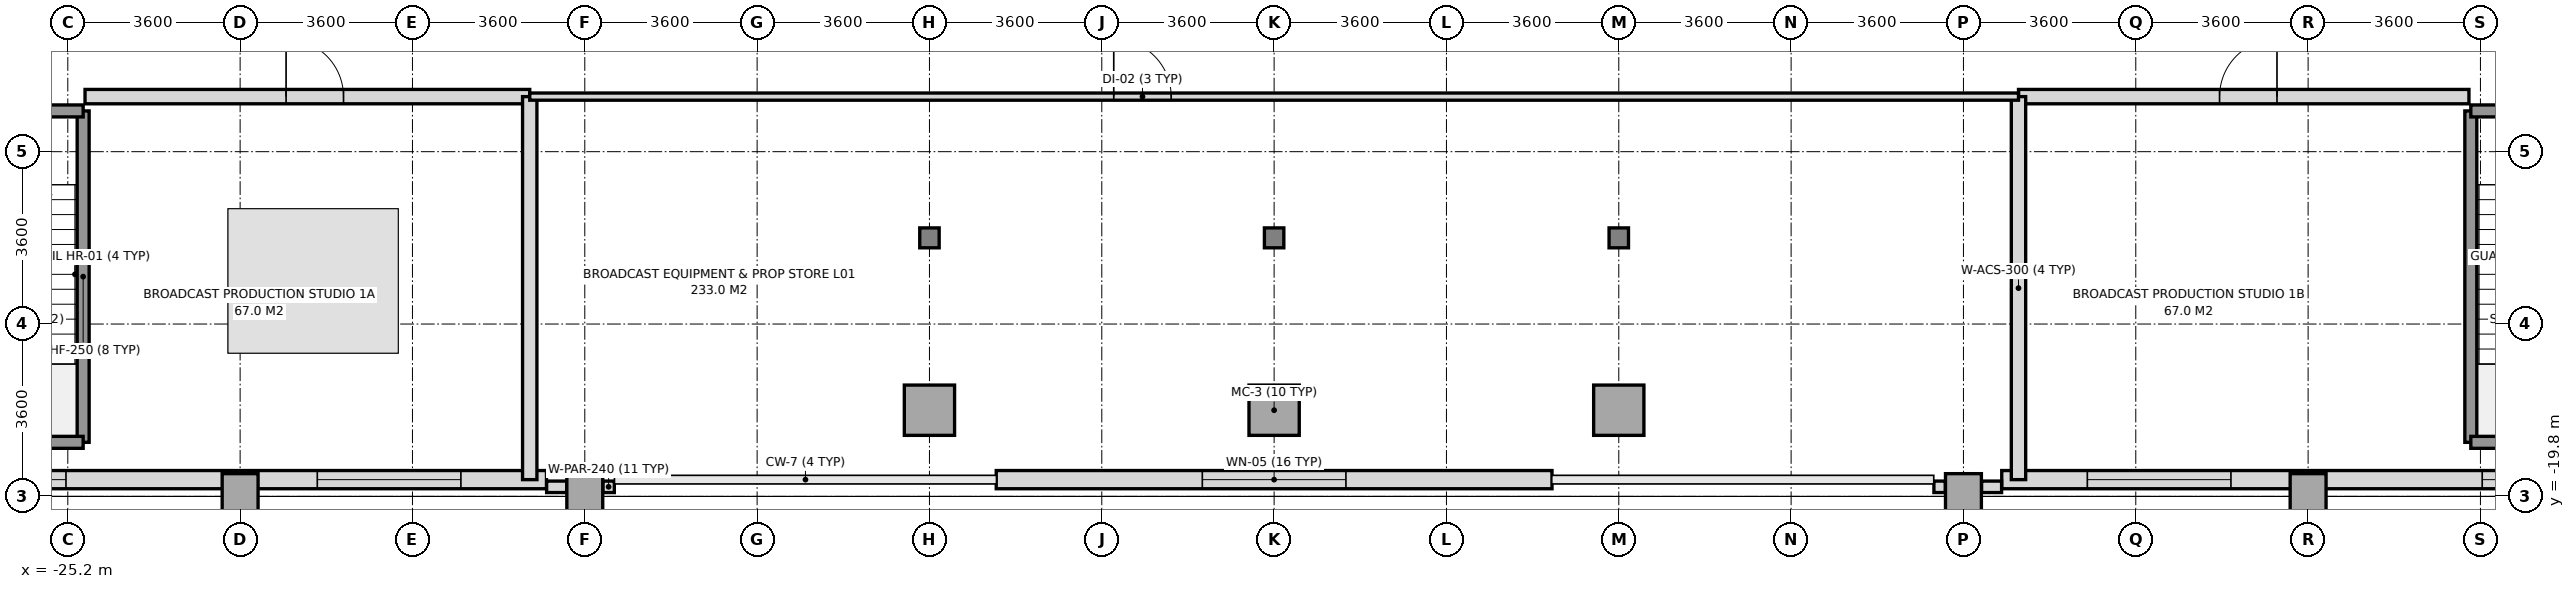
"""IFC4 building model, lengths in metres.
Left out: names, types, materials, properties, quantities, classifications, styles, units other than length and angle.
Written with IfcOpenShell. Run it as: python <this file> out.ifc"""

import sys

from ifc_helpers import new_model, si_unit, direction, frame, frame_2d, origin, origin_2d, place, context, subcontext, project, spatial, rectangle, i_section, extrude, source, transform, mapped, element, fill, save


model = new_model("IFC4")
c1 = context("Model", 3, precision=1e-05, world=origin(), true_north=direction((0.0, 1.0)))
c2 = subcontext(c1, "Body", "Model", "MODEL_VIEW")
j1 = project(units=[si_unit("LENGTHUNIT", "METRE"), si_unit("PLANEANGLEUNIT", "RADIAN")], contexts=[c1])
p1 = place(None, origin())
s1 = spatial("IfcSite", under=j1, at=p1, CompositionType="ELEMENT")
p2 = place(p1, origin())
s2 = spatial("IfcBuilding", under=s1, at=p2, CompositionType="ELEMENT")
p3 = place(p2, frame((0.0, 0.0, 5.4)))
s3 = spatial("IfcBuildingStorey", under=s2, at=p3, CompositionType="ELEMENT", Elevation=5.4)
m1 = source(origin(), c2, "Body", "SweptSolid", [
    extrude(rectangle(XDim=0.75, YDim=0.95, at=origin_2d()), origin(), (0.0, 0.0, 1.0), 4.52),
])
for number, where, z_axis, x_axis in (
    (1, (-21.6, -19.8, 0.0), (0.0, 0.0, 1.0), (1.0, 0.0, 0.0)),
    (2, (-14.4, -19.8, 0.0), (0.0, 0.0, 1.0), (1.0, 0.0, 0.0)),
):
    element("IfcColumn", number, at=place(p3, frame(where, z_axis=z_axis, x_axis=x_axis)), inside=s3, PredefinedType="COLUMN", context=c2, shape_type="MappedRepresentation", body=[
        mapped(m1, transform((0.0, 0.0, 0.0), x_axis=(1.0, 0.0, 0.0), y_axis=(0.0, 1.0, 0.0), z_axis=(0.0, 0.0, 1.0), scale=1.0)),
    ])
m2 = source(origin(), c2, "Body", "SweptSolid", [
    extrude(rectangle(XDim=1.05, YDim=1.05, at=origin_2d()), origin(), (0.0, 0.0, 1.0), 4.52),
])
p4 = place(p3, frame((-7.2, -18.0, 0.0), z_axis=(0.0, 0.0, 1.0), x_axis=(1.0, 0.0, 0.0)))
e3 = element("IfcColumn", 3, at=p4, inside=s3, PredefinedType="COLUMN", context=c2, shape_type="MappedRepresentation", body=[
    mapped(m2, transform((0.0, 0.0, 0.0), x_axis=(1.0, 0.0, 0.0), y_axis=(0.0, 1.0, 0.0), z_axis=(0.0, 0.0, 1.0), scale=1.0)),
])
m3 = source(origin(), c2, "Body", "SweptSolid", [
    extrude(i_section(OverallWidth=0.406, OverallDepth=0.416, WebThickness=0.024, FlangeThickness=0.039, at=origin_2d()), origin(), (0.0, 0.0, 1.0), 4.52),
])
p5 = place(p3, frame((-7.2, -14.4, 0.0), z_axis=(0.0, 0.0, 1.0), x_axis=(1.0, 0.0, 0.0)))
e4 = element("IfcColumn", 4, at=p5, inside=s3, PredefinedType="COLUMN", context=c2, shape_type="MappedRepresentation", body=[
    mapped(m3, transform((0.0, 0.0, 0.0), x_axis=(1.0, 0.0, 0.0), y_axis=(0.0, 1.0, 0.0), z_axis=(0.0, 0.0, 1.0), scale=1.0)),
])
p6 = place(p3, frame((0.0, -18.0, 0.0), z_axis=(0.0, 0.0, 1.0), x_axis=(1.0, 0.0, 0.0)))
e5 = element("IfcColumn", 5, at=p6, inside=s3, PredefinedType="COLUMN", context=c2, shape_type="MappedRepresentation", body=[
    mapped(m2, transform((0.0, 0.0, 0.0), x_axis=(1.0, 0.0, 0.0), y_axis=(0.0, 1.0, 0.0), z_axis=(0.0, 0.0, 1.0), scale=1.0)),
])
p7 = place(p3, frame((0.0, -14.4, 0.0), z_axis=(0.0, 0.0, 1.0), x_axis=(1.0, 0.0, 0.0)))
e6 = element("IfcColumn", 6, at=p7, inside=s3, PredefinedType="COLUMN", context=c2, shape_type="MappedRepresentation", body=[
    mapped(m3, transform((0.0, 0.0, 0.0), x_axis=(1.0, 0.0, 0.0), y_axis=(0.0, 1.0, 0.0), z_axis=(0.0, 0.0, 1.0), scale=1.0)),
])
p8 = place(p3, frame((7.2, -18.0, 0.0), z_axis=(0.0, 0.0, 1.0), x_axis=(1.0, 0.0, 0.0)))
e7 = element("IfcColumn", 7, at=p8, inside=s3, PredefinedType="COLUMN", context=c2, shape_type="MappedRepresentation", body=[
    mapped(m2, transform((0.0, 0.0, 0.0), x_axis=(1.0, 0.0, 0.0), y_axis=(0.0, 1.0, 0.0), z_axis=(0.0, 0.0, 1.0), scale=1.0)),
])
p9 = place(p3, frame((7.2, -14.4, 0.0), z_axis=(0.0, 0.0, 1.0), x_axis=(1.0, 0.0, 0.0)))
e8 = element("IfcColumn", 8, at=p9, inside=s3, PredefinedType="COLUMN", context=c2, shape_type="MappedRepresentation", body=[
    mapped(m3, transform((0.0, 0.0, 0.0), x_axis=(1.0, 0.0, 0.0), y_axis=(0.0, 1.0, 0.0), z_axis=(0.0, 0.0, 1.0), scale=1.0)),
])
for number, where, z_axis, x_axis in (
    (9, (14.4, -19.8, 0.0), (0.0, 0.0, 1.0), (1.0, 0.0, 0.0)),
    (10, (21.6, -19.8, 0.0), (0.0, 0.0, 1.0), (1.0, 0.0, 0.0)),
):
    element("IfcColumn", number, at=place(p3, frame(where, z_axis=z_axis, x_axis=x_axis)), inside=s3, PredefinedType="COLUMN", context=c2, shape_type="MappedRepresentation", body=[
        mapped(m1, transform((0.0, 0.0, 0.0), x_axis=(1.0, 0.0, 0.0), y_axis=(0.0, 1.0, 0.0), z_axis=(0.0, 0.0, 1.0), scale=1.0)),
    ])
p10 = place(p3, frame((-32.05, -19.45, 0.0), z_axis=(0.0, 0.0, 1.0), x_axis=(1.0, 0.0, 0.0)))
e11 = element("IfcWall", 11, at=p10, inside=s3, PredefinedType="SOLIDWALL", context=c2, shape_type="SweptSolid", body=[
    extrude(rectangle(XDim=16.85, YDim=0.38, at=frame_2d((8.425, 0.0))), origin(), (0.0, 0.0, 1.0), 3.77),
])
p11 = place(p10, frame((3.812, 0.0, 0.95)))
e12 = element("IfcOpeningElement", 12, at=p11, cuts=e11, PredefinedType="OPENING", context=c2, shape_type="SweptSolid", body=[
    extrude(rectangle(XDim=3.0, YDim=2.4, at=frame_2d((1.5, 1.2))), frame((0.0, 0.2, 0.0), z_axis=(0.0, -1.0, 0.0), x_axis=(1.0, 0.0, 0.0)), (0.0, 0.0, 1.0), 0.4),
])
p12 = place(p10, frame((12.062, 0.0, 0.95)))
e13 = element("IfcOpeningElement", 13, at=p12, cuts=e11, PredefinedType="OPENING", context=c2, shape_type="SweptSolid", body=[
    extrude(rectangle(XDim=3.0, YDim=2.4, at=frame_2d((1.5, 1.2))), frame((0.0, 0.2, 0.0), z_axis=(0.0, -1.0, 0.0), x_axis=(1.0, 0.0, 0.0)), (0.0, 0.0, 1.0), 0.4),
])
p13 = place(p3, frame((15.2, -19.45, 0.0), z_axis=(0.0, 0.0, 1.0), x_axis=(1.0, 0.0, 0.0)))
e14 = element("IfcWall", 14, at=p13, inside=s3, PredefinedType="SOLIDWALL", context=c2, shape_type="SweptSolid", body=[
    extrude(rectangle(XDim=16.85, YDim=0.38, at=frame_2d((8.425, 0.0))), origin(), (0.0, 0.0, 1.0), 3.77),
])
p14 = place(p13, frame((1.788, 0.0, 0.95)))
e15 = element("IfcOpeningElement", 15, at=p14, cuts=e14, PredefinedType="OPENING", context=c2, shape_type="SweptSolid", body=[
    extrude(rectangle(XDim=3.0, YDim=2.4, at=frame_2d((1.5, 1.2))), frame((0.0, 0.2, 0.0), z_axis=(0.0, -1.0, 0.0), x_axis=(1.0, 0.0, 0.0)), (0.0, 0.0, 1.0), 0.4),
])
p15 = place(p13, frame((10.037, 0.0, 0.95)))
e16 = element("IfcOpeningElement", 16, at=p15, cuts=e14, PredefinedType="OPENING", context=c2, shape_type="SweptSolid", body=[
    extrude(rectangle(XDim=3.0, YDim=2.4, at=frame_2d((1.5, 1.2))), frame((0.0, 0.2, 0.0), z_axis=(0.0, -1.0, 0.0), x_axis=(1.0, 0.0, 0.0)), (0.0, 0.0, 1.0), 0.4),
])
p16 = place(p3, frame((-5.805, -19.45, 0.0), z_axis=(0.0, 0.0, 1.0), x_axis=(1.0, 0.0, 0.0)))
e17 = element("IfcWall", 17, at=p16, inside=s3, PredefinedType="SOLIDWALL", context=c2, shape_type="SweptSolid", body=[
    extrude(rectangle(XDim=11.61, YDim=0.38, at=frame_2d((5.805, 0.0))), origin(), (0.0, 0.0, 1.0), 3.92),
])
p17 = place(p16, frame((4.305, 0.0, 0.95)))
e18 = element("IfcOpeningElement", 18, at=p17, cuts=e17, PredefinedType="OPENING", context=c2, shape_type="SweptSolid", body=[
    extrude(rectangle(XDim=3.0, YDim=2.4, at=frame_2d((1.5, 1.2))), frame((0.0, 0.2, 0.0), z_axis=(0.0, -1.0, 0.0), x_axis=(1.0, 0.0, 0.0)), (0.0, 0.0, 1.0), 0.4),
])
p18 = place(p3, frame((15.197, -19.6, 0.0), z_axis=(0.0, 0.0, 1.0), x_axis=(-1.0, 0.0, 0.0)))
e19 = element("IfcWall", 19, at=p18, inside=s3, PredefinedType="PARAPET", context=c2, shape_type="SweptSolid", body=[
    extrude(rectangle(XDim=0.419, YDim=0.24, at=frame_2d((0.209, 0.0))), origin(), (0.0, 0.0, 1.0), 1.15),
])
for number, where, z_axis, x_axis in (
    (20, (14.022, -19.6, 0.0), (0.0, 0.0, 1.0), (-1.0, 0.0, 0.0)),
    (21, (-13.783, -19.6, 0.0), (0.0, 0.0, 1.0), (-1.0, 0.0, 0.0)),
):
    element("IfcWall", number, at=place(p3, frame(where, z_axis=z_axis, x_axis=x_axis)), inside=s3, PredefinedType="PARAPET", context=c2, shape_type="SweptSolid", body=[
        extrude(rectangle(XDim=0.239, YDim=0.24, at=frame_2d((0.12, 0.0))), origin(), (0.0, 0.0, 1.0), 1.15),
    ])
p19 = place(p3, frame((-14.778, -19.6, 0.0), z_axis=(0.0, 0.0, 1.0), x_axis=(-1.0, 0.0, 0.0)))
e22 = element("IfcWall", 22, at=p19, inside=s3, PredefinedType="PARAPET", context=c2, shape_type="SweptSolid", body=[
    extrude(rectangle(XDim=0.419, YDim=0.24, at=frame_2d((0.209, 0.0))), origin(), (0.0, 0.0, 1.0), 1.15),
])
p20 = place(p3, frame((-24.879, -18.671, 0.0), z_axis=(0.0, 0.0, 1.0), x_axis=(0.0, 1.0, 0.0)))
e23 = element("IfcWall", 23, at=p20, inside=s3, PredefinedType="SOLIDWALL", context=c2, shape_type="SweptSolid", body=[
    extrude(rectangle(XDim=6.922, YDim=0.25, at=frame_2d((3.461, 0.0))), origin(), (0.0, 0.0, 1.0), 4.52),
])
p21 = place(p3, frame((-28.001, -18.671, 0.0), z_axis=(0.0, 0.0, 1.0), x_axis=(1.0, 0.0, 0.0)))
e24 = element("IfcWall", 24, at=p21, inside=s3, PredefinedType="SOLIDWALL", context=c2, shape_type="SweptSolid", body=[
    extrude(rectangle(XDim=3.122, YDim=0.25, at=frame_2d((1.561, 0.0))), origin(), (0.0, 0.0, 1.0), 4.52),
])
p22 = place(p3, frame((-28.001, -11.749, 0.0), z_axis=(0.0, 0.0, 1.0), x_axis=(1.0, 0.0, 0.0)))
e25 = element("IfcWall", 25, at=p22, inside=s3, PredefinedType="SOLIDWALL", context=c2, shape_type="SweptSolid", body=[
    extrude(rectangle(XDim=3.122, YDim=0.25, at=frame_2d((1.561, 0.0))), origin(), (0.0, 0.0, 1.0), 4.52),
])
p23 = place(p22, frame((0.8, 0.0, 0.0)))
e26 = element("IfcOpeningElement", 26, at=p23, cuts=e25, PredefinedType="OPENING", context=c2, shape_type="SweptSolid", body=[
    extrude(rectangle(XDim=1.2, YDim=2.2, at=frame_2d((0.6, 1.1))), frame((0.0, 0.135, 0.0), z_axis=(0.0, -1.0, 0.0), x_axis=(1.0, 0.0, 0.0)), (0.0, 0.0, 1.0), 0.27),
])
p24 = place(p3, frame((24.999, -18.671, 0.0), z_axis=(0.0, 0.0, 1.0), x_axis=(0.0, 1.0, 0.0)))
e27 = element("IfcWall", 27, at=p24, inside=s3, PredefinedType="SOLIDWALL", context=c2, shape_type="SweptSolid", body=[
    extrude(rectangle(XDim=6.922, YDim=0.25, at=frame_2d((3.461, 0.0))), origin(), (0.0, 0.0, 1.0), 4.52),
])
p25 = place(p3, frame((24.999, -18.671, 0.0), z_axis=(0.0, 0.0, 1.0), x_axis=(1.0, 0.0, 0.0)))
e28 = element("IfcWall", 28, at=p25, inside=s3, PredefinedType="SOLIDWALL", context=c2, shape_type="SweptSolid", body=[
    extrude(rectangle(XDim=3.122, YDim=0.25, at=frame_2d((1.561, 0.0))), origin(), (0.0, 0.0, 1.0), 4.52),
])
p26 = place(p3, frame((24.999, -11.749, 0.0), z_axis=(0.0, 0.0, 1.0), x_axis=(1.0, 0.0, 0.0)))
e29 = element("IfcWall", 29, at=p26, inside=s3, PredefinedType="SOLIDWALL", context=c2, shape_type="SweptSolid", body=[
    extrude(rectangle(XDim=3.122, YDim=0.25, at=frame_2d((1.561, 0.0))), origin(), (0.0, 0.0, 1.0), 4.52),
])
p27 = place(p26, frame((0.8, 0.0, 0.0)))
e30 = element("IfcOpeningElement", 30, at=p27, cuts=e29, PredefinedType="OPENING", context=c2, shape_type="SweptSolid", body=[
    extrude(rectangle(XDim=1.2, YDim=2.2, at=frame_2d((0.6, 1.1))), frame((0.0, 0.135, 0.0), z_axis=(0.0, -1.0, 0.0), x_axis=(1.0, 0.0, 0.0)), (0.0, 0.0, 1.0), 0.27),
])
p28 = place(p3, frame((-24.84, -11.45, 0.0), z_axis=(0.0, 0.0, 1.0), x_axis=(1.0, 0.0, 0.0)))
e31 = element("IfcWall", 31, at=p28, inside=s3, PredefinedType="SOLIDWALL", context=c2, shape_type="SweptSolid", body=[
    extrude(rectangle(XDim=9.29, YDim=0.3, at=frame_2d((4.645, 0.0))), origin(), (0.0, 0.0, 1.0), 4.52),
])
p29 = place(p28, frame((4.2, 0.0, 0.0)))
e32 = element("IfcOpeningElement", 32, at=p29, cuts=e31, PredefinedType="OPENING", context=c2, shape_type="SweptSolid", body=[
    extrude(rectangle(XDim=1.2, YDim=2.2, at=frame_2d((0.6, 1.1))), frame((0.0, 0.16, 0.0), z_axis=(0.0, -1.0, 0.0), x_axis=(1.0, 0.0, 0.0)), (0.0, 0.0, 1.0), 0.32),
])
p30 = place(p3, frame((-15.55, -19.45, 0.0), z_axis=(0.0, 0.0, 1.0), x_axis=(0.0, 1.0, 0.0)))
e33 = element("IfcWall", 33, at=p30, inside=s3, PredefinedType="SOLIDWALL", context=c2, shape_type="SweptSolid", body=[
    extrude(rectangle(XDim=8.0, YDim=0.3, at=frame_2d((4.0, 0.0))), origin(), (0.0, 0.0, 1.0), 3.77),
])
p31 = place(p3, frame((15.55, -11.45, 0.0), z_axis=(0.0, 0.0, 1.0), x_axis=(1.0, 0.0, 0.0)))
e34 = element("IfcWall", 34, at=p31, inside=s3, PredefinedType="SOLIDWALL", context=c2, shape_type="SweptSolid", body=[
    extrude(rectangle(XDim=9.41, YDim=0.3, at=frame_2d((4.705, 0.0))), origin(), (0.0, 0.0, 1.0), 4.52),
])
p32 = place(p31, frame((4.2, 0.0, 0.0)))
e35 = element("IfcOpeningElement", 35, at=p32, cuts=e34, PredefinedType="OPENING", context=c2, shape_type="SweptSolid", body=[
    extrude(rectangle(XDim=1.2, YDim=2.2, at=frame_2d((0.6, 1.1))), frame((0.0, 0.16, 0.0), z_axis=(0.0, -1.0, 0.0), x_axis=(1.0, 0.0, 0.0)), (0.0, 0.0, 1.0), 0.32),
])
p33 = place(p3, frame((15.55, -19.45, 0.0), z_axis=(0.0, 0.0, 1.0), x_axis=(0.0, 1.0, 0.0)))
e36 = element("IfcWall", 36, at=p33, inside=s3, PredefinedType="SOLIDWALL", context=c2, shape_type="SweptSolid", body=[
    extrude(rectangle(XDim=8.0, YDim=0.3, at=frame_2d((4.0, 0.0))), origin(), (0.0, 0.0, 1.0), 3.77),
])
p34 = place(p3, frame((-15.55, -11.45, 0.0), z_axis=(0.0, 0.0, 1.0), x_axis=(1.0, 0.0, 0.0)))
e37 = element("IfcWall", 37, at=p34, inside=s3, PredefinedType="PARTITIONING", context=c2, shape_type="SweptSolid", body=[
    extrude(rectangle(XDim=31.1, YDim=0.15, at=frame_2d((15.55, 0.0))), origin(), (0.0, 0.0, 1.0), 3.92),
])
p35 = place(p34, frame((12.2, 0.0, 0.0)))
e38 = element("IfcOpeningElement", 38, at=p35, cuts=e37, PredefinedType="OPENING", context=c2, shape_type="SweptSolid", body=[
    extrude(rectangle(XDim=1.2, YDim=2.2, at=frame_2d((0.6, 1.1))), frame((0.0, 0.085, 0.0), z_axis=(0.0, -1.0, 0.0), x_axis=(1.0, 0.0, 0.0)), (0.0, 0.0, 1.0), 0.17),
])
m4 = source(origin(), c2, "Body", "SweptSolid", [
    extrude(rectangle(XDim=3.0, YDim=2.4, at=frame_2d((1.5, 1.2))), frame((0.0, 0.03, 0.0), z_axis=(0.0, -1.0, 0.0), x_axis=(1.0, 0.0, 0.0)), (0.0, 0.0, 1.0), 0.06),
])
p36 = place(p11, origin())
e39 = element("IfcWindow", 39, at=p36, inside=s3, PartitioningType="SINGLE_PANEL", PredefinedType="WINDOW", context=c2, shape_type="MappedRepresentation", body=[
    mapped(m4, transform((0.0, 0.0, 0.0), x_axis=(1.0, 0.0, 0.0), y_axis=(0.0, 1.0, 0.0), z_axis=(0.0, 0.0, 1.0), scale=1.0)),
])
fill(e12, e39)
p37 = place(p12, origin())
e40 = element("IfcWindow", 40, at=p37, inside=s3, PartitioningType="SINGLE_PANEL", PredefinedType="WINDOW", context=c2, shape_type="MappedRepresentation", body=[
    mapped(m4, transform((0.0, 0.0, 0.0), x_axis=(1.0, 0.0, 0.0), y_axis=(0.0, 1.0, 0.0), z_axis=(0.0, 0.0, 1.0), scale=1.0)),
])
fill(e13, e40)
p38 = place(p14, origin())
e41 = element("IfcWindow", 41, at=p38, inside=s3, PartitioningType="SINGLE_PANEL", PredefinedType="WINDOW", context=c2, shape_type="MappedRepresentation", body=[
    mapped(m4, transform((0.0, 0.0, 0.0), x_axis=(1.0, 0.0, 0.0), y_axis=(0.0, 1.0, 0.0), z_axis=(0.0, 0.0, 1.0), scale=1.0)),
])
fill(e15, e41)
p39 = place(p15, origin())
e42 = element("IfcWindow", 42, at=p39, inside=s3, PartitioningType="SINGLE_PANEL", PredefinedType="WINDOW", context=c2, shape_type="MappedRepresentation", body=[
    mapped(m4, transform((0.0, 0.0, 0.0), x_axis=(1.0, 0.0, 0.0), y_axis=(0.0, 1.0, 0.0), z_axis=(0.0, 0.0, 1.0), scale=1.0)),
])
fill(e16, e42)
p40 = place(p17, origin())
e43 = element("IfcWindow", 43, at=p40, inside=s3, PartitioningType="SINGLE_PANEL", PredefinedType="WINDOW", context=c2, shape_type="MappedRepresentation", body=[
    mapped(m4, transform((0.0, 0.0, 0.0), x_axis=(1.0, 0.0, 0.0), y_axis=(0.0, 1.0, 0.0), z_axis=(0.0, 0.0, 1.0), scale=1.0)),
])
fill(e18, e43)
m5 = source(origin(), c2, "Body", "SweptSolid", [
    extrude(rectangle(XDim=1.2, YDim=2.2, at=frame_2d((0.6, 1.1))), frame((0.0, 0.025, 0.0), z_axis=(0.0, -1.0, 0.0), x_axis=(1.0, 0.0, 0.0)), (0.0, 0.0, 1.0), 0.05),
])
p41 = place(p29, origin())
e44 = element("IfcDoor", 44, at=p41, inside=s3, OperationType="SINGLE_SWING_LEFT", PredefinedType="DOOR", context=c2, shape_type="MappedRepresentation", body=[
    mapped(m5, transform((0.0, 0.0, 0.0), x_axis=(1.0, 0.0, 0.0), y_axis=(0.0, 1.0, 0.0), z_axis=(0.0, 0.0, 1.0), scale=1.0)),
])
fill(e32, e44)
p42 = place(p32, origin())
e45 = element("IfcDoor", 45, at=p42, inside=s3, OperationType="SINGLE_SWING_RIGHT", PredefinedType="DOOR", context=c2, shape_type="MappedRepresentation", body=[
    mapped(m5, transform((0.0, 0.0, 0.0), x_axis=(1.0, 0.0, 0.0), y_axis=(0.0, 1.0, 0.0), z_axis=(0.0, 0.0, 1.0), scale=1.0)),
])
fill(e35, e45)
p43 = place(p35, origin())
e46 = element("IfcDoor", 46, at=p43, inside=s3, OperationType="SINGLE_SWING_LEFT", PredefinedType="DOOR", context=c2, shape_type="MappedRepresentation", body=[
    mapped(m5, transform((0.0, 0.0, 0.0), x_axis=(1.0, 0.0, 0.0), y_axis=(0.0, 1.0, 0.0), z_axis=(0.0, 0.0, 1.0), scale=1.0)),
])
fill(e38, e46)
save(model, sys.argv[1])
